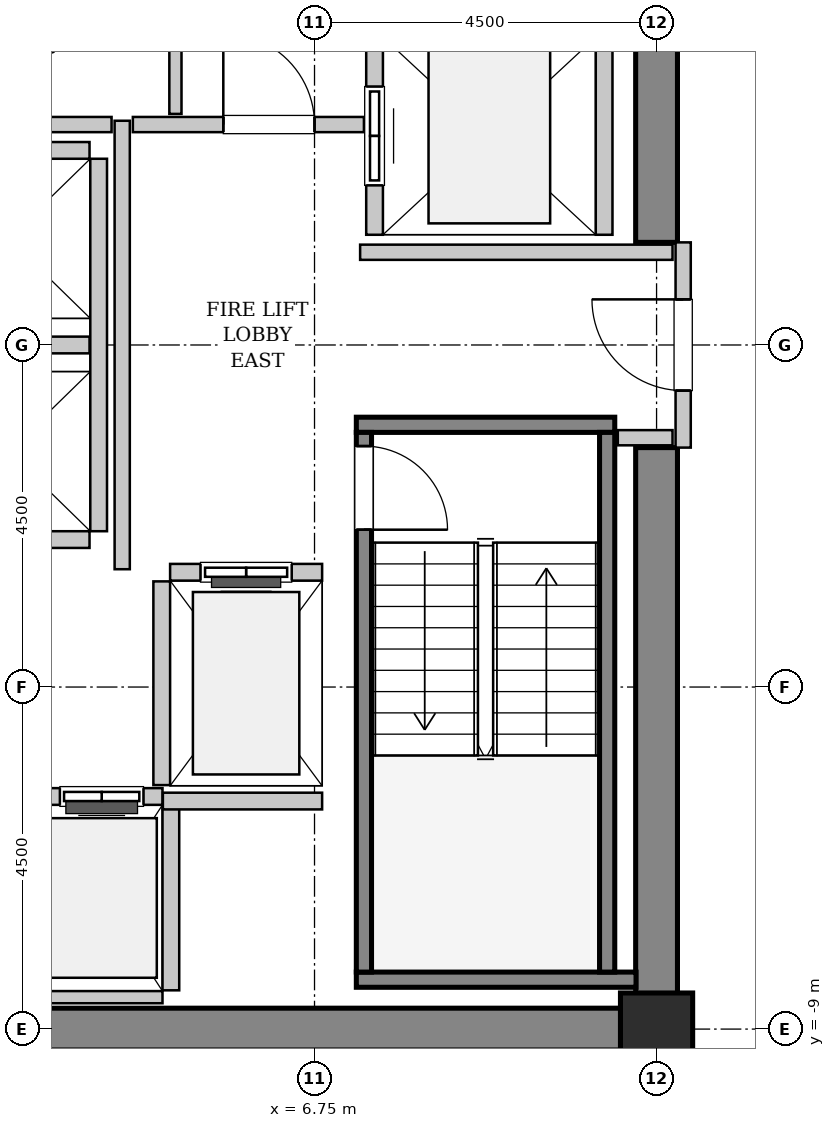
"""IFC4 building model, lengths in metres.
Left out: names, types, materials, properties, quantities, classifications, styles, units other than length and angle.
Written with IfcOpenShell. Run it as: python <this file> out.ifc"""

import sys

from ifc_helpers import new_model, si_unit, direction, frame, frame_2d, origin, origin_2d, place, context, subcontext, project, spatial, rectangle, hollow_rectangle, extrude, source, transform, mapped, element, fill, save


model = new_model("IFC4")
c1 = context("Model", 3, precision=1e-05, world=origin(), true_north=direction((0.0, 1.0)))
c2 = subcontext(c1, "Body", "Model", "MODEL_VIEW")
j1 = project(units=[si_unit("LENGTHUNIT", "METRE"), si_unit("PLANEANGLEUNIT", "RADIAN")], contexts=[c1])
p1 = place(None, origin())
s1 = spatial("IfcSite", under=j1, at=p1, CompositionType="ELEMENT")
p2 = place(p1, origin())
s2 = spatial("IfcBuilding", under=s1, at=p2, CompositionType="ELEMENT")
p3 = place(p2, frame((0.0, 0.0, 167.8)))
s3 = spatial("IfcBuildingStorey", under=s2, at=p3, CompositionType="ELEMENT", Elevation=167.8)
m1 = source(origin(), c2, "Body", "SweptSolid", [
    extrude(rectangle(XDim=9.975, YDim=0.55, at=frame_2d((4.987, 0.0))), origin(), (0.0, 0.0, 1.0), 3.8),
])
p4 = place(p3, frame((1.55, -9.0, 0.0), z_axis=(0.0, 0.0, 1.0), x_axis=(1.0, 0.0, 0.0)))
e1 = element("IfcWall", 1, at=p4, inside=s3, PredefinedType="SHEAR", context=c2, shape_type="MappedRepresentation", body=[
    mapped(m1, transform((0.0, 0.0, 0.0), x_axis=(1.0, 0.0, 0.0), y_axis=(0.0, 1.0, 0.0), z_axis=(0.0, 0.0, 1.0), scale=1.0)),
])
m2 = source(origin(), c2, "Body", "SweptSolid", [
    extrude(rectangle(XDim=7.375, YDim=0.55, at=frame_2d((3.688, 0.0))), origin(), (0.0, 0.0, 1.0), 3.8),
])
for number, where, z_axis, x_axis in (
    (2, (11.25, -8.725, 0.0), (0.0, 0.0, 1.0), (0.0, 1.0, 0.0)),
    (3, (11.25, 1.35, 0.0), (0.0, 0.0, 1.0), (0.0, 1.0, 0.0)),
):
    element("IfcWall", number, at=place(p3, frame(where, z_axis=z_axis, x_axis=x_axis)), inside=s3, PredefinedType="SHEAR", context=c2, shape_type="MappedRepresentation", body=[
        mapped(m2, transform((0.0, 0.0, 0.0), x_axis=(1.0, 0.0, 0.0), y_axis=(0.0, 1.0, 0.0), z_axis=(0.0, 0.0, 1.0), scale=1.0)),
    ])
m3 = source(origin(), c2, "Body", "SweptSolid", [
    extrude(hollow_rectangle(XDim=0.95, YDim=0.95, WallThickness=0.045, InnerFilletRadius=0.045, OuterFilletRadius=0.09, at=origin_2d()), origin(), (0.0, 0.0, 1.0), 3.8),
])
p5 = place(p3, frame((11.25, -9.0, 0.0), z_axis=(0.0, 0.0, 1.0), x_axis=(1.0, 0.0, 0.0)))
e4 = element("IfcColumn", 4, at=p5, inside=s3, PredefinedType="COLUMN", context=c2, shape_type="MappedRepresentation", body=[
    mapped(m3, transform((0.0, 0.0, 0.0), x_axis=(1.0, 0.0, 0.0), y_axis=(0.0, 1.0, 0.0), z_axis=(0.0, 0.0, 1.0), scale=1.0)),
])
m4 = source(origin(), c2, "Body", "SweptSolid", [
    extrude(rectangle(XDim=3.4, YDim=0.2, at=frame_2d((1.7, 0.0))), origin(), (0.0, 0.0, 1.0), 3.8),
])
p6 = place(p3, frame((7.3, -1.05, 0.0), z_axis=(0.0, 0.0, 1.0), x_axis=(1.0, 0.0, 0.0)))
e5 = element("IfcWall", 5, at=p6, inside=s3, PredefinedType="SOLIDWALL", context=c2, shape_type="MappedRepresentation", body=[
    mapped(m4, transform((0.0, 0.0, 0.0), x_axis=(1.0, 0.0, 0.0), y_axis=(0.0, 1.0, 0.0), z_axis=(0.0, 0.0, 1.0), scale=1.0)),
])
m5 = source(origin(), c2, "Body", "SweptSolid", [
    extrude(rectangle(XDim=3.68, YDim=0.2, at=frame_2d((1.84, 0.0))), origin(), (0.0, 0.0, 1.0), 3.8),
])
p7 = place(p3, frame((7.3, -8.35, 0.0), z_axis=(0.0, 0.0, 1.0), x_axis=(1.0, 0.0, 0.0)))
e6 = element("IfcWall", 6, at=p7, inside=s3, PredefinedType="SOLIDWALL", context=c2, shape_type="MappedRepresentation", body=[
    mapped(m5, transform((0.0, 0.0, 0.0), x_axis=(1.0, 0.0, 0.0), y_axis=(0.0, 1.0, 0.0), z_axis=(0.0, 0.0, 1.0), scale=1.0)),
])
m6 = source(origin(), c2, "Body", "SweptSolid", [
    extrude(rectangle(XDim=7.1, YDim=0.2, at=frame_2d((3.55, 0.0))), origin(), (0.0, 0.0, 1.0), 3.8),
])
p8 = place(p3, frame((7.4, -1.15, 0.0), z_axis=(0.0, 0.0, 1.0), x_axis=(0.0, -1.0, 0.0)))
e7 = element("IfcWall", 7, at=p8, inside=s3, PredefinedType="SOLIDWALL", context=c2, shape_type="MappedRepresentation", body=[
    mapped(m6, transform((0.0, 0.0, 0.0), x_axis=(1.0, 0.0, 0.0), y_axis=(0.0, 1.0, 0.0), z_axis=(0.0, 0.0, 1.0), scale=1.0)),
])
p9 = place(p8, frame((0.18, 0.0, 0.0)))
e8 = element("IfcOpeningElement", 8, at=p9, cuts=e7, PredefinedType="OPENING", context=c2, shape_type="SweptSolid", body=[
    extrude(rectangle(XDim=1.1, YDim=2.15, at=frame_2d((0.55, 1.075))), frame((0.0, 0.11, 0.0), z_axis=(0.0, -1.0, 0.0), x_axis=(1.0, 0.0, 0.0)), (0.0, 0.0, 1.0), 0.22),
])
p10 = place(p3, frame((10.6, -1.15, 0.0), z_axis=(0.0, 0.0, 1.0), x_axis=(0.0, -1.0, 0.0)))
e9 = element("IfcWall", 9, at=p10, inside=s3, PredefinedType="SOLIDWALL", context=c2, shape_type="MappedRepresentation", body=[
    mapped(m6, transform((0.0, 0.0, 0.0), x_axis=(1.0, 0.0, 0.0), y_axis=(0.0, 1.0, 0.0), z_axis=(0.0, 0.0, 1.0), scale=1.0)),
])
m7 = source(origin(), c2, "Body", "SweptSolid", [
    extrude(rectangle(XDim=2.0, YDim=0.22, at=frame_2d((1.0, 0.0))), origin(), (0.0, 0.0, 1.0), 3.535),
])
p11 = place(p3, frame((6.85, -2.99, 0.0), z_axis=(0.0, 0.0, 1.0), x_axis=(-1.0, 0.0, 0.0)))
e10 = element("IfcWall", 10, at=p11, inside=s3, PredefinedType="SOLIDWALL", context=c2, shape_type="MappedRepresentation", body=[
    mapped(m7, transform((0.0, 0.0, 0.0), x_axis=(1.0, 0.0, 0.0), y_axis=(0.0, 1.0, 0.0), z_axis=(0.0, 0.0, 1.0), scale=1.0)),
])
p12 = place(p11, frame((0.4, 0.0, 0.0)))
e11 = element("IfcOpeningElement", 11, at=p12, cuts=e10, PredefinedType="OPENING", context=c2, shape_type="SweptSolid", body=[
    extrude(rectangle(XDim=1.2, YDim=2.2, at=frame_2d((0.6, 1.1))), frame((0.0, 0.12, 0.0), z_axis=(0.0, -1.0, 0.0), x_axis=(1.0, 0.0, 0.0)), (0.0, 0.0, 1.0), 0.24),
])
m8 = source(origin(), c2, "Body", "SweptSolid", [
    extrude(rectangle(XDim=2.68, YDim=0.22, at=frame_2d((1.34, 0.0))), origin(), (0.0, 0.0, 1.0), 3.535),
])
p13 = place(p3, frame((4.74, -3.11, 0.0), z_axis=(0.0, 0.0, 1.0), x_axis=(0.0, -1.0, 0.0)))
e12 = element("IfcWall", 12, at=p13, inside=s3, PredefinedType="SOLIDWALL", context=c2, shape_type="MappedRepresentation", body=[
    mapped(m8, transform((0.0, 0.0, 0.0), x_axis=(1.0, 0.0, 0.0), y_axis=(0.0, 1.0, 0.0), z_axis=(0.0, 0.0, 1.0), scale=1.0)),
])
m9 = source(origin(), c2, "Body", "SweptSolid", [
    extrude(rectangle(XDim=5.45, YDim=0.22, at=frame_2d((2.725, 0.0))), origin(), (0.0, 0.0, 1.0), 3.535),
])
p14 = place(p3, frame((7.54, 6.9, 0.0), z_axis=(0.0, 0.0, 1.0), x_axis=(0.0, -1.0, 0.0)))
e13 = element("IfcWall", 13, at=p14, inside=s3, PredefinedType="SOLIDWALL", context=c2, shape_type="MappedRepresentation", body=[
    mapped(m9, transform((0.0, 0.0, 0.0), x_axis=(1.0, 0.0, 0.0), y_axis=(0.0, 1.0, 0.0), z_axis=(0.0, 0.0, 1.0), scale=1.0)),
])
p15 = place(p14, frame((3.5, 0.0, 0.0)))
e14 = element("IfcOpeningElement", 14, at=p15, cuts=e13, PredefinedType="OPENING", context=c2, shape_type="SweptSolid", body=[
    extrude(rectangle(XDim=1.3, YDim=2.3, at=frame_2d((0.65, 1.15))), frame((0.0, 0.12, 0.0), z_axis=(0.0, -1.0, 0.0), x_axis=(1.0, 0.0, 0.0)), (0.0, 0.0, 1.0), 0.24),
])
p16 = place(p14, frame((0.65, 0.0, 0.0)))
e15 = element("IfcOpeningElement", 15, at=p16, cuts=e13, PredefinedType="OPENING", context=c2, shape_type="SweptSolid", body=[
    extrude(rectangle(XDim=1.3, YDim=2.3, at=frame_2d((0.65, 1.15))), frame((0.0, 0.12, 0.0), z_axis=(0.0, -1.0, 0.0), x_axis=(1.0, 0.0, 0.0)), (0.0, 0.0, 1.0), 0.24),
])
p17 = place(p3, frame((10.56, 1.45, 0.0), z_axis=(0.0, 0.0, 1.0), x_axis=(0.0, 1.0, 0.0)))
e16 = element("IfcWall", 16, at=p17, inside=s3, PredefinedType="SOLIDWALL", context=c2, shape_type="MappedRepresentation", body=[
    mapped(m9, transform((0.0, 0.0, 0.0), x_axis=(1.0, 0.0, 0.0), y_axis=(0.0, 1.0, 0.0), z_axis=(0.0, 0.0, 1.0), scale=1.0)),
])
m10 = source(origin(), c2, "Body", "SweptSolid", [
    extrude(rectangle(XDim=3.2, YDim=0.22, at=frame_2d((1.6, 0.0))), origin(), (0.0, 0.0, 1.0), 3.535),
])
p18 = place(p3, frame((4.75, -5.94, 0.0), z_axis=(0.0, 0.0, 1.0), x_axis=(-1.0, 0.0, 0.0)))
e17 = element("IfcWall", 17, at=p18, inside=s3, PredefinedType="SOLIDWALL", context=c2, shape_type="MappedRepresentation", body=[
    mapped(m10, transform((0.0, 0.0, 0.0), x_axis=(1.0, 0.0, 0.0), y_axis=(0.0, 1.0, 0.0), z_axis=(0.0, 0.0, 1.0), scale=1.0)),
])
p19 = place(p18, frame((1.875, 0.0, 0.0)))
e18 = element("IfcOpeningElement", 18, at=p19, cuts=e17, PredefinedType="OPENING", context=c2, shape_type="SweptSolid", body=[
    extrude(rectangle(XDim=1.1, YDim=2.2, at=frame_2d((0.55, 1.1))), frame((0.0, 0.12, 0.0), z_axis=(0.0, -1.0, 0.0), x_axis=(1.0, 0.0, 0.0)), (0.0, 0.0, 1.0), 0.24),
])
p20 = place(p18, frame((0.25, 0.0, 0.0)))
e19 = element("IfcOpeningElement", 19, at=p20, cuts=e17, PredefinedType="OPENING", context=c2, shape_type="SweptSolid", body=[
    extrude(rectangle(XDim=1.1, YDim=2.2, at=frame_2d((0.55, 1.1))), frame((0.0, 0.12, 0.0), z_axis=(0.0, -1.0, 0.0), x_axis=(1.0, 0.0, 0.0)), (0.0, 0.0, 1.0), 0.24),
])
m11 = source(origin(), c2, "Body", "SweptSolid", [
    extrude(rectangle(XDim=3.2, YDim=0.16, at=frame_2d((1.6, 0.0))), origin(), (0.0, 0.0, 1.0), 2.425),
])
p21 = place(p3, frame((1.55, -8.58, 0.0), z_axis=(0.0, 0.0, 1.0), x_axis=(1.0, 0.0, 0.0)))
e20 = element("IfcWall", 20, at=p21, inside=s3, PredefinedType="PARTITIONING", context=c2, shape_type="MappedRepresentation", body=[
    mapped(m11, transform((0.0, 0.0, 0.0), x_axis=(1.0, 0.0, 0.0), y_axis=(0.0, 1.0, 0.0), z_axis=(0.0, 0.0, 1.0), scale=1.0)),
])
m12 = source(origin(), c2, "Body", "SweptSolid", [
    extrude(rectangle(XDim=2.43, YDim=0.22, at=frame_2d((1.215, 0.0))), origin(), (0.0, 0.0, 1.0), 3.535),
])
p22 = place(p3, frame((4.86, -8.49, 0.0), z_axis=(0.0, 0.0, 1.0), x_axis=(0.0, 1.0, 0.0)))
e21 = element("IfcWall", 21, at=p22, inside=s3, PredefinedType="SOLIDWALL", context=c2, shape_type="MappedRepresentation", body=[
    mapped(m12, transform((0.0, 0.0, 0.0), x_axis=(1.0, 0.0, 0.0), y_axis=(0.0, 1.0, 0.0), z_axis=(0.0, 0.0, 1.0), scale=1.0)),
])
m13 = source(origin(), c2, "Body", "SweptSolid", [
    extrude(rectangle(XDim=4.9, YDim=0.22, at=frame_2d((2.45, 0.0))), origin(), (0.0, 0.0, 1.0), 3.535),
])
p23 = place(p3, frame((3.91, -2.45, 0.0), z_axis=(0.0, 0.0, 1.0), x_axis=(0.0, 1.0, 0.0)))
e22 = element("IfcWall", 22, at=p23, inside=s3, PredefinedType="SOLIDWALL", context=c2, shape_type="MappedRepresentation", body=[
    mapped(m13, transform((0.0, 0.0, 0.0), x_axis=(1.0, 0.0, 0.0), y_axis=(0.0, 1.0, 0.0), z_axis=(0.0, 0.0, 1.0), scale=1.0)),
])
m14 = source(origin(), c2, "Body", "SweptSolid", [
    extrude(rectangle(XDim=2.13, YDim=0.22, at=frame_2d((1.065, 0.0))), origin(), (0.0, 0.0, 1.0), 3.535),
])
for number, where, z_axis, x_axis in (
    (23, (1.66, -2.56, 0.0), (0.0, 0.0, 1.0), (1.0, 0.0, 0.0)),
    (24, (1.66, 0.0, 0.0), (0.0, 0.0, 1.0), (1.0, 0.0, 0.0)),
    (25, (3.79, 2.56, 0.0), (0.0, 0.0, 1.0), (-1.0, 0.0, 0.0)),
):
    element("IfcWall", number, at=place(p3, frame(where, z_axis=z_axis, x_axis=x_axis)), inside=s3, PredefinedType="SOLIDWALL", context=c2, shape_type="MappedRepresentation", body=[
        mapped(m14, transform((0.0, 0.0, 0.0), x_axis=(1.0, 0.0, 0.0), y_axis=(0.0, 1.0, 0.0), z_axis=(0.0, 0.0, 1.0), scale=1.0)),
    ])
m15 = source(origin(), c2, "Body", "SweptSolid", [
    extrude(rectangle(XDim=2.095, YDim=0.22, at=frame_2d((1.048, 0.0))), origin(), (0.0, 0.0, 1.0), 3.535),
])
p24 = place(p3, frame((4.755, -6.0, 0.0), z_axis=(0.0, 0.0, 1.0), x_axis=(1.0, 0.0, 0.0)))
e26 = element("IfcWall", 26, at=p24, inside=s3, PredefinedType="SOLIDWALL", context=c2, shape_type="MappedRepresentation", body=[
    mapped(m15, transform((0.0, 0.0, 0.0), x_axis=(1.0, 0.0, 0.0), y_axis=(0.0, 1.0, 0.0), z_axis=(0.0, 0.0, 1.0), scale=1.0)),
])
m16 = source(origin(), c2, "Body", "SweptSolid", [
    extrude(rectangle(XDim=2.7, YDim=0.2, at=frame_2d((1.35, 0.0))), origin(), (0.0, 0.0, 1.0), 2.425),
])
p25 = place(p3, frame((11.6, -1.35, 0.0), z_axis=(0.0, 0.0, 1.0), x_axis=(0.0, 1.0, 0.0)))
e27 = element("IfcWall", 27, at=p25, inside=s3, PredefinedType="PARTITIONING", context=c2, shape_type="MappedRepresentation", body=[
    mapped(m16, transform((0.0, 0.0, 0.0), x_axis=(1.0, 0.0, 0.0), y_axis=(0.0, 1.0, 0.0), z_axis=(0.0, 0.0, 1.0), scale=1.0)),
])
p26 = place(p25, frame((0.75, 0.0, 0.0)))
e28 = element("IfcOpeningElement", 28, at=p26, cuts=e27, PredefinedType="OPENING", context=c2, shape_type="SweptSolid", body=[
    extrude(rectangle(XDim=1.2, YDim=2.15, at=frame_2d((0.6, 1.075))), frame((0.0, 0.11, 0.0), z_axis=(0.0, -1.0, 0.0), x_axis=(1.0, 0.0, 0.0)), (0.0, 0.0, 1.0), 0.22),
])
m17 = source(origin(), c2, "Body", "SweptSolid", [
    extrude(rectangle(XDim=5.9, YDim=0.2, at=frame_2d((2.95, 0.0))), origin(), (0.0, 0.0, 1.0), 3.535),
])
p27 = place(p3, frame((4.22, -2.95, 0.0), z_axis=(0.0, 0.0, 1.0), x_axis=(0.0, 1.0, 0.0)))
e29 = element("IfcWall", 29, at=p27, inside=s3, PredefinedType="PARTITIONING", context=c2, shape_type="MappedRepresentation", body=[
    mapped(m17, transform((0.0, 0.0, 0.0), x_axis=(1.0, 0.0, 0.0), y_axis=(0.0, 1.0, 0.0), z_axis=(0.0, 0.0, 1.0), scale=1.0)),
])
m18 = source(origin(), c2, "Body", "SweptSolid", [
    extrude(rectangle(XDim=2.52, YDim=0.2, at=frame_2d((1.26, 0.0))), origin(), (0.0, 0.0, 1.0), 3.535),
])
p28 = place(p3, frame((1.56, 2.9, 0.0), z_axis=(0.0, 0.0, 1.0), x_axis=(1.0, 0.0, 0.0)))
e30 = element("IfcWall", 30, at=p28, inside=s3, PredefinedType="PARTITIONING", context=c2, shape_type="MappedRepresentation", body=[
    mapped(m18, transform((0.0, 0.0, 0.0), x_axis=(1.0, 0.0, 0.0), y_axis=(0.0, 1.0, 0.0), z_axis=(0.0, 0.0, 1.0), scale=1.0)),
])
m19 = source(origin(), c2, "Body", "SweptSolid", [
    extrude(rectangle(XDim=3.04, YDim=0.2, at=frame_2d((1.52, 0.0))), origin(), (0.0, 0.0, 1.0), 3.535),
])
p29 = place(p3, frame((4.36, 2.9, 0.0), z_axis=(0.0, 0.0, 1.0), x_axis=(1.0, 0.0, 0.0)))
e31 = element("IfcWall", 31, at=p29, inside=s3, PredefinedType="PARTITIONING", context=c2, shape_type="MappedRepresentation", body=[
    mapped(m19, transform((0.0, 0.0, 0.0), x_axis=(1.0, 0.0, 0.0), y_axis=(0.0, 1.0, 0.0), z_axis=(0.0, 0.0, 1.0), scale=1.0)),
])
p30 = place(p29, frame((1.19, 0.0, 0.0)))
e32 = element("IfcOpeningElement", 32, at=p30, cuts=e31, PredefinedType="OPENING", context=c2, shape_type="SweptSolid", body=[
    extrude(rectangle(XDim=1.2, YDim=2.15, at=frame_2d((0.6, 1.075))), frame((0.0, 0.11, 0.0), z_axis=(0.0, -1.0, 0.0), x_axis=(1.0, 0.0, 0.0)), (0.0, 0.0, 1.0), 0.22),
])
m20 = source(origin(), c2, "Body", "SweptSolid", [
    extrude(rectangle(XDim=4.11, YDim=0.2, at=frame_2d((2.055, 0.0))), origin(), (0.0, 0.0, 1.0), 3.535),
])
p31 = place(p3, frame((7.35, 1.22, 0.0), z_axis=(0.0, 0.0, 1.0), x_axis=(1.0, 0.0, 0.0)))
e33 = element("IfcWall", 33, at=p31, inside=s3, PredefinedType="PARTITIONING", context=c2, shape_type="MappedRepresentation", body=[
    mapped(m20, transform((0.0, 0.0, 0.0), x_axis=(1.0, 0.0, 0.0), y_axis=(0.0, 1.0, 0.0), z_axis=(0.0, 0.0, 1.0), scale=1.0)),
])
m21 = source(origin(), c2, "Body", "SweptSolid", [
    extrude(rectangle(XDim=0.72, YDim=0.2, at=frame_2d((0.36, 0.0))), origin(), (0.0, 0.0, 1.0), 3.535),
])
p32 = place(p3, frame((10.74, -1.22, 0.0), z_axis=(0.0, 0.0, 1.0), x_axis=(1.0, 0.0, 0.0)))
e34 = element("IfcWall", 34, at=p32, inside=s3, PredefinedType="PARTITIONING", context=c2, shape_type="MappedRepresentation", body=[
    mapped(m21, transform((0.0, 0.0, 0.0), x_axis=(1.0, 0.0, 0.0), y_axis=(0.0, 1.0, 0.0), z_axis=(0.0, 0.0, 1.0), scale=1.0)),
])
m22 = source(origin(), c2, "Body", "SweptSolid", [
    extrude(rectangle(XDim=5.45, YDim=0.16, at=frame_2d((2.725, 0.0))), origin(), (0.0, 0.0, 1.0), 3.535),
])
p33 = place(p3, frame((4.92, 3.04, 0.0), z_axis=(0.0, 0.0, 1.0), x_axis=(0.0, 1.0, 0.0)))
e35 = element("IfcWall", 35, at=p33, inside=s3, PredefinedType="PARTITIONING", context=c2, shape_type="MappedRepresentation", body=[
    mapped(m22, transform((0.0, 0.0, 0.0), x_axis=(1.0, 0.0, 0.0), y_axis=(0.0, 1.0, 0.0), z_axis=(0.0, 0.0, 1.0), scale=1.0)),
])
m23 = source(origin(), c2, "Body", "SweptSolid", [
    extrude(rectangle(XDim=1.1, YDim=2.15, at=frame_2d((0.55, 1.075))), frame((0.0, 0.025, 0.0), z_axis=(0.0, -1.0, 0.0), x_axis=(1.0, 0.0, 0.0)), (0.0, 0.0, 1.0), 0.05),
])
p34 = place(p9, origin())
e36 = element("IfcDoor", 36, at=p34, inside=s3, OperationType="SINGLE_SWING_RIGHT", PredefinedType="DOOR", context=c2, shape_type="MappedRepresentation", body=[
    mapped(m23, transform((0.0, 0.0, 0.0), x_axis=(1.0, 0.0, 0.0), y_axis=(0.0, 1.0, 0.0), z_axis=(0.0, 0.0, 1.0), scale=1.0)),
])
fill(e8, e36)
m24 = source(origin(), c2, "Body", "SweptSolid", [
    extrude(rectangle(XDim=1.2, YDim=2.2, at=frame_2d((0.6, 1.1))), frame((0.0, 0.025, 0.0), z_axis=(0.0, -1.0, 0.0), x_axis=(1.0, 0.0, 0.0)), (0.0, 0.0, 1.0), 0.05),
])
p35 = place(p12, origin())
e37 = element("IfcDoor", 37, at=p35, inside=s3, OperationType="SLIDING_TO_LEFT", PredefinedType="DOOR", context=c2, shape_type="MappedRepresentation", body=[
    mapped(m24, transform((0.0, 0.0, 0.0), x_axis=(1.0, 0.0, 0.0), y_axis=(0.0, 1.0, 0.0), z_axis=(0.0, 0.0, 1.0), scale=1.0)),
])
fill(e11, e37)
m25 = source(origin(), c2, "Body", "SweptSolid", [
    extrude(rectangle(XDim=1.3, YDim=2.3, at=frame_2d((0.65, 1.15))), frame((0.0, 0.025, 0.0), z_axis=(0.0, -1.0, 0.0), x_axis=(1.0, 0.0, 0.0)), (0.0, 0.0, 1.0), 0.05),
])
p36 = place(p15, origin())
e38 = element("IfcDoor", 38, at=p36, inside=s3, OperationType="SLIDING_TO_RIGHT", PredefinedType="DOOR", context=c2, shape_type="MappedRepresentation", body=[
    mapped(m25, transform((0.0, 0.0, 0.0), x_axis=(1.0, 0.0, 0.0), y_axis=(0.0, 1.0, 0.0), z_axis=(0.0, 0.0, 1.0), scale=1.0)),
])
fill(e14, e38)
m26 = source(origin(), c2, "Body", "SweptSolid", [
    extrude(rectangle(XDim=1.1, YDim=2.2, at=frame_2d((0.55, 1.1))), frame((0.0, 0.025, 0.0), z_axis=(0.0, -1.0, 0.0), x_axis=(1.0, 0.0, 0.0)), (0.0, 0.0, 1.0), 0.05),
])
p37 = place(p20, origin())
e39 = element("IfcDoor", 39, at=p37, inside=s3, OperationType="DOUBLE_DOOR_SLIDING", PredefinedType="DOOR", context=c2, shape_type="MappedRepresentation", body=[
    mapped(m26, transform((0.0, 0.0, 0.0), x_axis=(1.0, 0.0, 0.0), y_axis=(0.0, 1.0, 0.0), z_axis=(0.0, 0.0, 1.0), scale=1.0)),
])
fill(e19, e39)
m27 = source(origin(), c2, "Body", "SweptSolid", [
    extrude(rectangle(XDim=1.2, YDim=2.15, at=frame_2d((0.6, 1.075))), frame((0.0, 0.025, 0.0), z_axis=(0.0, -1.0, 0.0), x_axis=(1.0, 0.0, 0.0)), (0.0, 0.0, 1.0), 0.05),
])
p38 = place(p26, origin())
e40 = element("IfcDoor", 40, at=p38, inside=s3, OperationType="SINGLE_SWING_RIGHT", PredefinedType="DOOR", context=c2, shape_type="MappedRepresentation", body=[
    mapped(m27, transform((0.0, 0.0, 0.0), x_axis=(1.0, 0.0, 0.0), y_axis=(0.0, 1.0, 0.0), z_axis=(0.0, 0.0, 1.0), scale=1.0)),
])
fill(e28, e40)
p39 = place(p30, origin())
e41 = element("IfcDoor", 41, at=p39, inside=s3, OperationType="SINGLE_SWING_LEFT", PredefinedType="DOOR", context=c2, shape_type="MappedRepresentation", body=[
    mapped(m27, transform((0.0, 0.0, 0.0), x_axis=(1.0, 0.0, 0.0), y_axis=(0.0, 1.0, 0.0), z_axis=(0.0, 0.0, 1.0), scale=1.0)),
])
fill(e32, e41)
save(model, sys.argv[1])
